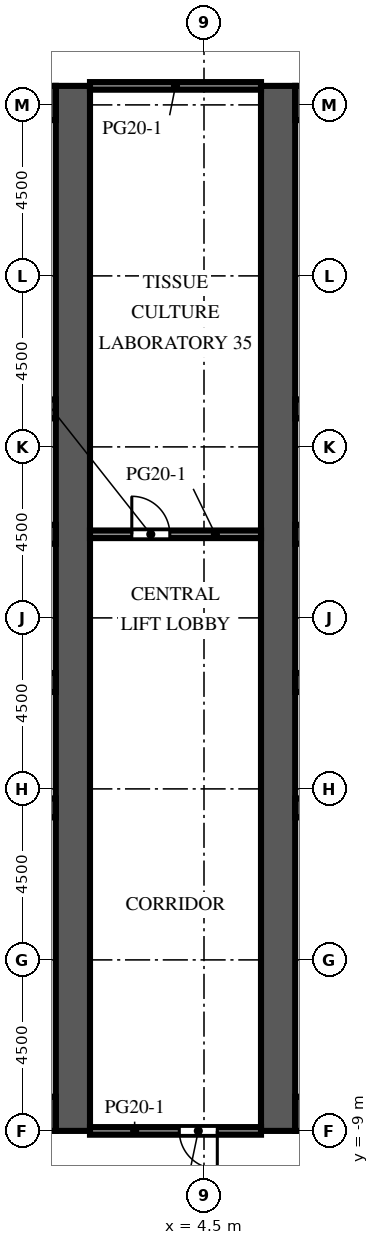
"""IFC4 building model, lengths in metres.
Left out: names, types, materials, properties, quantities, classifications, styles, units other than length and angle.
Written with IfcOpenShell. Run it as: python <this file> out.ifc"""

import sys

from ifc_helpers import new_model, si_unit, direction, frame, frame_2d, origin, place, context, subcontext, project, spatial, rectangle, extrude, element, fill, save


model = new_model("IFC4")
c1 = context("Model", 3, precision=1e-05, world=origin(), true_north=direction((0.0, 1.0)))
c2 = subcontext(c1, "Body", "Model", "MODEL_VIEW")
j1 = project(units=[si_unit("LENGTHUNIT", "METRE"), si_unit("PLANEANGLEUNIT", "RADIAN")], contexts=[c1])
p1 = place(None, origin())
s1 = spatial("IfcSite", under=j1, at=p1, CompositionType="ELEMENT")
p2 = place(p1, origin())
s2 = spatial("IfcBuilding", under=s1, at=p2, CompositionType="ELEMENT")
p3 = place(p2, frame((0.0, 0.0, 86.1)))
s3 = spatial("IfcBuildingStorey", under=s2, at=p3, CompositionType="ELEMENT", Elevation=86.1)
p4 = place(p3, frame((1.05, -9.0, 0.0), z_axis=(0.0, 0.0, 1.0), x_axis=(0.0, 1.0, 0.0)))
e1 = element("IfcWall", 1, at=p4, inside=s3, PredefinedType="SHEAR", context=c2, shape_type="SweptSolid", body=[
    extrude(rectangle(XDim=27.5, YDim=0.9, at=frame_2d((13.75, 0.0))), origin(), (0.0, 0.0, 1.0), 4.1),
])
p5 = place(p4, frame((12.55, 0.0, 0.0)))
e2 = element("IfcOpeningElement", 2, at=p5, cuts=e1, PredefinedType="OPENING", context=c2, shape_type="SweptSolid", body=[
    extrude(rectangle(XDim=2.4, YDim=2.4, at=frame_2d((1.2, 1.2))), frame((0.0, 0.46, 0.0), z_axis=(0.0, -1.0, 0.0), x_axis=(1.0, 0.0, 0.0)), (0.0, 0.0, 1.0), 0.92),
])
p6 = place(p4, frame((3.975, 0.0, 0.0)))
e3 = element("IfcOpeningElement", 3, at=p6, cuts=e1, PredefinedType="OPENING", context=c2, shape_type="SweptSolid", body=[
    extrude(rectangle(XDim=1.2, YDim=2.1, at=frame_2d((0.6, 1.05))), frame((0.0, 0.46, 0.0), z_axis=(0.0, -1.0, 0.0), x_axis=(1.0, 0.0, 0.0)), (0.0, 0.0, 1.0), 0.92),
])
p7 = place(p4, frame((22.325, 0.0, 0.0)))
e4 = element("IfcOpeningElement", 4, at=p7, cuts=e1, PredefinedType="OPENING", context=c2, shape_type="SweptSolid", body=[
    extrude(rectangle(XDim=1.2, YDim=2.1, at=frame_2d((0.6, 1.05))), frame((0.0, 0.46, 0.0), z_axis=(0.0, -1.0, 0.0), x_axis=(1.0, 0.0, 0.0)), (0.0, 0.0, 1.0), 0.92),
])
for number, where, z_axis, x_axis in (
    (5, (-9.6, -8.55, 0.0), (0.0, 0.0, 1.0), (1.0, 0.0, 0.0)),
    (6, (-9.6, 18.05, 0.0), (0.0, 0.0, 1.0), (1.0, 0.0, 0.0)),
):
    element("IfcWall", number, at=place(p3, frame(where, z_axis=z_axis, x_axis=x_axis)), inside=s3, PredefinedType="SHEAR", context=c2, shape_type="SweptSolid", body=[
        extrude(rectangle(XDim=10.2, YDim=0.9, at=frame_2d((5.1, 0.0))), origin(), (0.0, 0.0, 1.0), 4.1),
    ])
p8 = place(p3, frame((-9.6, -0.5, 0.0), z_axis=(0.0, 0.0, 1.0), x_axis=(1.0, 0.0, 0.0)))
e7 = element("IfcWall", 7, at=p8, inside=s3, PredefinedType="SHEAR", context=c2, shape_type="SweptSolid", body=[
    extrude(rectangle(XDim=10.2, YDim=0.5, at=frame_2d((5.1, 0.0))), origin(), (0.0, 0.0, 1.0), 4.1),
])
p9 = place(p3, frame((-9.6, 2.8, 0.0), z_axis=(0.0, 0.0, 1.0), x_axis=(1.0, 0.0, 0.0)))
e8 = element("IfcWall", 8, at=p9, inside=s3, PredefinedType="SHEAR", context=c2, shape_type="SweptSolid", body=[
    extrude(rectangle(XDim=10.2, YDim=0.5, at=frame_2d((5.1, 0.0))), origin(), (0.0, 0.0, 1.0), 4.1),
])
p10 = place(p9, frame((0.562, 0.0, 0.0)))
e9 = element("IfcOpeningElement", 9, at=p10, cuts=e8, PredefinedType="OPENING", context=c2, shape_type="SweptSolid", body=[
    extrude(rectangle(XDim=1.1, YDim=2.1, at=frame_2d((0.55, 1.05))), frame((0.0, 0.26, 0.0), z_axis=(0.0, -1.0, 0.0), x_axis=(1.0, 0.0, 0.0)), (0.0, 0.0, 1.0), 0.52),
])
p11 = place(p9, frame((3.238, 0.0, 0.0)))
e10 = element("IfcOpeningElement", 10, at=p11, cuts=e8, PredefinedType="OPENING", context=c2, shape_type="SweptSolid", body=[
    extrude(rectangle(XDim=1.1, YDim=2.1, at=frame_2d((0.55, 1.05))), frame((0.0, 0.26, 0.0), z_axis=(0.0, -1.0, 0.0), x_axis=(1.0, 0.0, 0.0)), (0.0, 0.0, 1.0), 0.52),
])
p12 = place(p9, frame((8.538, 0.0, 0.0)))
e11 = element("IfcOpeningElement", 11, at=p12, cuts=e8, PredefinedType="OPENING", context=c2, shape_type="SweptSolid", body=[
    extrude(rectangle(XDim=1.1, YDim=2.1, at=frame_2d((0.55, 1.05))), frame((0.0, 0.26, 0.0), z_axis=(0.0, -1.0, 0.0), x_axis=(1.0, 0.0, 0.0)), (0.0, 0.0, 1.0), 0.52),
])
p13 = place(p3, frame((-9.6, 6.7, 0.0), z_axis=(0.0, 0.0, 1.0), x_axis=(1.0, 0.0, 0.0)))
e12 = element("IfcWall", 12, at=p13, inside=s3, PredefinedType="SHEAR", context=c2, shape_type="SweptSolid", body=[
    extrude(rectangle(XDim=10.2, YDim=0.5, at=frame_2d((5.1, 0.0))), origin(), (0.0, 0.0, 1.0), 4.1),
])
p14 = place(p13, frame((0.562, 0.0, 0.0)))
e13 = element("IfcOpeningElement", 13, at=p14, cuts=e12, PredefinedType="OPENING", context=c2, shape_type="SweptSolid", body=[
    extrude(rectangle(XDim=1.1, YDim=2.1, at=frame_2d((0.55, 1.05))), frame((0.0, 0.26, 0.0), z_axis=(0.0, -1.0, 0.0), x_axis=(1.0, 0.0, 0.0)), (0.0, 0.0, 1.0), 0.52),
])
p15 = place(p13, frame((3.288, 0.0, 0.0)))
e14 = element("IfcOpeningElement", 14, at=p15, cuts=e12, PredefinedType="OPENING", context=c2, shape_type="SweptSolid", body=[
    extrude(rectangle(XDim=1.0, YDim=2.1, at=frame_2d((0.5, 1.05))), frame((0.0, 0.26, 0.0), z_axis=(0.0, -1.0, 0.0), x_axis=(1.0, 0.0, 0.0)), (0.0, 0.0, 1.0), 0.52),
])
p16 = place(p13, frame((5.913, 0.0, 0.0)))
e15 = element("IfcOpeningElement", 15, at=p16, cuts=e12, PredefinedType="OPENING", context=c2, shape_type="SweptSolid", body=[
    extrude(rectangle(XDim=1.0, YDim=2.1, at=frame_2d((0.5, 1.05))), frame((0.0, 0.26, 0.0), z_axis=(0.0, -1.0, 0.0), x_axis=(1.0, 0.0, 0.0)), (0.0, 0.0, 1.0), 0.52),
])
p17 = place(p13, frame((8.587, 0.0, 0.0)))
e16 = element("IfcOpeningElement", 16, at=p17, cuts=e12, PredefinedType="OPENING", context=c2, shape_type="SweptSolid", body=[
    extrude(rectangle(XDim=1.0, YDim=2.1, at=frame_2d((0.5, 1.05))), frame((0.0, 0.26, 0.0), z_axis=(0.0, -1.0, 0.0), x_axis=(1.0, 0.0, 0.0)), (0.0, 0.0, 1.0), 0.52),
])
p18 = place(p3, frame((-9.6, 10.0, 0.0), z_axis=(0.0, 0.0, 1.0), x_axis=(1.0, 0.0, 0.0)))
e17 = element("IfcWall", 17, at=p18, inside=s3, PredefinedType="SHEAR", context=c2, shape_type="SweptSolid", body=[
    extrude(rectangle(XDim=10.2, YDim=0.5, at=frame_2d((5.1, 0.0))), origin(), (0.0, 0.0, 1.0), 4.1),
])
p19 = place(p3, frame((6.45, -9.0, 0.0), z_axis=(0.0, 0.0, 1.0), x_axis=(0.0, 1.0, 0.0)))
e18 = element("IfcWall", 18, at=p19, inside=s3, PredefinedType="SHEAR", context=c2, shape_type="SweptSolid", body=[
    extrude(rectangle(XDim=27.5, YDim=0.9, at=frame_2d((13.75, 0.0))), origin(), (0.0, 0.0, 1.0), 4.1),
])
p20 = place(p19, frame((12.55, 0.0, 0.0)))
e19 = element("IfcOpeningElement", 19, at=p20, cuts=e18, PredefinedType="OPENING", context=c2, shape_type="SweptSolid", body=[
    extrude(rectangle(XDim=2.4, YDim=2.4, at=frame_2d((1.2, 1.2))), frame((0.0, 0.46, 0.0), z_axis=(0.0, -1.0, 0.0), x_axis=(1.0, 0.0, 0.0)), (0.0, 0.0, 1.0), 0.92),
])
p21 = place(p19, frame((3.975, 0.0, 0.0)))
e20 = element("IfcOpeningElement", 20, at=p21, cuts=e18, PredefinedType="OPENING", context=c2, shape_type="SweptSolid", body=[
    extrude(rectangle(XDim=1.2, YDim=2.1, at=frame_2d((0.6, 1.05))), frame((0.0, 0.46, 0.0), z_axis=(0.0, -1.0, 0.0), x_axis=(1.0, 0.0, 0.0)), (0.0, 0.0, 1.0), 0.92),
])
p22 = place(p19, frame((22.325, 0.0, 0.0)))
e21 = element("IfcOpeningElement", 21, at=p22, cuts=e18, PredefinedType="OPENING", context=c2, shape_type="SweptSolid", body=[
    extrude(rectangle(XDim=1.2, YDim=2.1, at=frame_2d((0.6, 1.05))), frame((0.0, 0.46, 0.0), z_axis=(0.0, -1.0, 0.0), x_axis=(1.0, 0.0, 0.0)), (0.0, 0.0, 1.0), 0.92),
])
for number, where, z_axis, x_axis in (
    (22, (6.9, -8.55, 0.0), (0.0, 0.0, 1.0), (1.0, 0.0, 0.0)),
    (23, (6.9, 18.05, 0.0), (0.0, 0.0, 1.0), (1.0, 0.0, 0.0)),
):
    element("IfcWall", number, at=place(p3, frame(where, z_axis=z_axis, x_axis=x_axis)), inside=s3, PredefinedType="SHEAR", context=c2, shape_type="SweptSolid", body=[
        extrude(rectangle(XDim=10.2, YDim=0.9, at=frame_2d((5.1, 0.0))), origin(), (0.0, 0.0, 1.0), 4.1),
    ])
p23 = place(p3, frame((6.9, -0.5, 0.0), z_axis=(0.0, 0.0, 1.0), x_axis=(1.0, 0.0, 0.0)))
e24 = element("IfcWall", 24, at=p23, inside=s3, PredefinedType="SHEAR", context=c2, shape_type="SweptSolid", body=[
    extrude(rectangle(XDim=10.2, YDim=0.5, at=frame_2d((5.1, 0.0))), origin(), (0.0, 0.0, 1.0), 4.1),
])
p24 = place(p3, frame((6.9, 2.8, 0.0), z_axis=(0.0, 0.0, 1.0), x_axis=(1.0, 0.0, 0.0)))
e25 = element("IfcWall", 25, at=p24, inside=s3, PredefinedType="SHEAR", context=c2, shape_type="SweptSolid", body=[
    extrude(rectangle(XDim=10.2, YDim=0.5, at=frame_2d((5.1, 0.0))), origin(), (0.0, 0.0, 1.0), 4.1),
])
p25 = place(p24, frame((0.562, 0.0, 0.0)))
e26 = element("IfcOpeningElement", 26, at=p25, cuts=e25, PredefinedType="OPENING", context=c2, shape_type="SweptSolid", body=[
    extrude(rectangle(XDim=1.1, YDim=2.1, at=frame_2d((0.55, 1.05))), frame((0.0, 0.26, 0.0), z_axis=(0.0, -1.0, 0.0), x_axis=(1.0, 0.0, 0.0)), (0.0, 0.0, 1.0), 0.52),
])
p26 = place(p24, frame((3.238, 0.0, 0.0)))
e27 = element("IfcOpeningElement", 27, at=p26, cuts=e25, PredefinedType="OPENING", context=c2, shape_type="SweptSolid", body=[
    extrude(rectangle(XDim=1.1, YDim=2.1, at=frame_2d((0.55, 1.05))), frame((0.0, 0.26, 0.0), z_axis=(0.0, -1.0, 0.0), x_axis=(1.0, 0.0, 0.0)), (0.0, 0.0, 1.0), 0.52),
])
p27 = place(p24, frame((8.538, 0.0, 0.0)))
e28 = element("IfcOpeningElement", 28, at=p27, cuts=e25, PredefinedType="OPENING", context=c2, shape_type="SweptSolid", body=[
    extrude(rectangle(XDim=1.1, YDim=2.1, at=frame_2d((0.55, 1.05))), frame((0.0, 0.26, 0.0), z_axis=(0.0, -1.0, 0.0), x_axis=(1.0, 0.0, 0.0)), (0.0, 0.0, 1.0), 0.52),
])
p28 = place(p3, frame((6.9, 6.7, 0.0), z_axis=(0.0, 0.0, 1.0), x_axis=(1.0, 0.0, 0.0)))
e29 = element("IfcWall", 29, at=p28, inside=s3, PredefinedType="SHEAR", context=c2, shape_type="SweptSolid", body=[
    extrude(rectangle(XDim=10.2, YDim=0.5, at=frame_2d((5.1, 0.0))), origin(), (0.0, 0.0, 1.0), 4.1),
])
p29 = place(p28, frame((0.562, 0.0, 0.0)))
e30 = element("IfcOpeningElement", 30, at=p29, cuts=e29, PredefinedType="OPENING", context=c2, shape_type="SweptSolid", body=[
    extrude(rectangle(XDim=1.1, YDim=2.1, at=frame_2d((0.55, 1.05))), frame((0.0, 0.26, 0.0), z_axis=(0.0, -1.0, 0.0), x_axis=(1.0, 0.0, 0.0)), (0.0, 0.0, 1.0), 0.52),
])
p30 = place(p28, frame((3.288, 0.0, 0.0)))
e31 = element("IfcOpeningElement", 31, at=p30, cuts=e29, PredefinedType="OPENING", context=c2, shape_type="SweptSolid", body=[
    extrude(rectangle(XDim=1.0, YDim=2.1, at=frame_2d((0.5, 1.05))), frame((0.0, 0.26, 0.0), z_axis=(0.0, -1.0, 0.0), x_axis=(1.0, 0.0, 0.0)), (0.0, 0.0, 1.0), 0.52),
])
p31 = place(p28, frame((5.913, 0.0, 0.0)))
e32 = element("IfcOpeningElement", 32, at=p31, cuts=e29, PredefinedType="OPENING", context=c2, shape_type="SweptSolid", body=[
    extrude(rectangle(XDim=1.0, YDim=2.1, at=frame_2d((0.5, 1.05))), frame((0.0, 0.26, 0.0), z_axis=(0.0, -1.0, 0.0), x_axis=(1.0, 0.0, 0.0)), (0.0, 0.0, 1.0), 0.52),
])
p32 = place(p28, frame((8.587, 0.0, 0.0)))
e33 = element("IfcOpeningElement", 33, at=p32, cuts=e29, PredefinedType="OPENING", context=c2, shape_type="SweptSolid", body=[
    extrude(rectangle(XDim=1.0, YDim=2.1, at=frame_2d((0.5, 1.05))), frame((0.0, 0.26, 0.0), z_axis=(0.0, -1.0, 0.0), x_axis=(1.0, 0.0, 0.0)), (0.0, 0.0, 1.0), 0.52),
])
p33 = place(p3, frame((6.9, 10.0, 0.0), z_axis=(0.0, 0.0, 1.0), x_axis=(1.0, 0.0, 0.0)))
e34 = element("IfcWall", 34, at=p33, inside=s3, PredefinedType="SHEAR", context=c2, shape_type="SweptSolid", body=[
    extrude(rectangle(XDim=10.2, YDim=0.5, at=frame_2d((5.1, 0.0))), origin(), (0.0, 0.0, 1.0), 4.1),
])
p34 = place(p3, frame((6.0, -9.0, 0.0), z_axis=(0.0, 0.0, 1.0), x_axis=(-1.0, 0.0, 0.0)))
e35 = element("IfcWall", 35, at=p34, inside=s3, PredefinedType="PARTITIONING", context=c2, shape_type="SweptSolid", body=[
    extrude(rectangle(XDim=4.5, YDim=0.2, at=frame_2d((2.25, 0.0))), origin(), (0.0, 0.0, 1.0), 3.65),
])
p35 = place(p34, frame((1.15, 0.0, 0.0)))
e36 = element("IfcOpeningElement", 36, at=p35, cuts=e35, PredefinedType="OPENING", context=c2, shape_type="SweptSolid", body=[
    extrude(rectangle(XDim=1.0, YDim=2.1, at=frame_2d((0.5, 1.05))), frame((0.0, 0.11, 0.0), z_axis=(0.0, -1.0, 0.0), x_axis=(1.0, 0.0, 0.0)), (0.0, 0.0, 1.0), 0.22),
])
p36 = place(p3, frame((1.5, 6.7, 0.0), z_axis=(0.0, 0.0, 1.0), x_axis=(1.0, 0.0, 0.0)))
e37 = element("IfcWall", 37, at=p36, inside=s3, PredefinedType="PARTITIONING", context=c2, shape_type="SweptSolid", body=[
    extrude(rectangle(XDim=4.5, YDim=0.2, at=frame_2d((2.25, 0.0))), origin(), (0.0, 0.0, 1.0), 3.65),
])
p37 = place(p36, frame((1.1, 0.0, 0.0)))
e38 = element("IfcOpeningElement", 38, at=p37, cuts=e37, PredefinedType="OPENING", context=c2, shape_type="SweptSolid", body=[
    extrude(rectangle(XDim=1.0, YDim=2.1, at=frame_2d((0.5, 1.05))), frame((0.0, 0.11, 0.0), z_axis=(0.0, -1.0, 0.0), x_axis=(1.0, 0.0, 0.0)), (0.0, 0.0, 1.0), 0.22),
])
p38 = place(p3, frame((1.5, 18.5, 0.0), z_axis=(0.0, 0.0, 1.0), x_axis=(1.0, 0.0, 0.0)))
e39 = element("IfcWall", 39, at=p38, inside=s3, PredefinedType="PARTITIONING", context=c2, shape_type="SweptSolid", body=[
    extrude(rectangle(XDim=4.5, YDim=0.2, at=frame_2d((2.25, 0.0))), origin(), (0.0, 0.0, 1.0), 3.65),
])
p39 = place(p5, origin())
e40 = element("IfcDoor", 40, at=p39, inside=s3, OperationType="DOUBLE_DOOR_DOUBLE_SWING", PredefinedType="DOOR", context=c2, shape_type="SweptSolid", body=[
    extrude(rectangle(XDim=2.4, YDim=2.4, at=frame_2d((1.2, 1.2))), frame((0.0, 0.025, 0.0), z_axis=(0.0, -1.0, 0.0), x_axis=(1.0, 0.0, 0.0)), (0.0, 0.0, 1.0), 0.05),
])
fill(e2, e40)
p40 = place(p20, origin())
e41 = element("IfcDoor", 41, at=p40, inside=s3, OperationType="DOUBLE_DOOR_DOUBLE_SWING", PredefinedType="DOOR", context=c2, shape_type="SweptSolid", body=[
    extrude(rectangle(XDim=2.4, YDim=2.4, at=frame_2d((1.2, 1.2))), frame((0.0, 0.025, 0.0), z_axis=(0.0, -1.0, 0.0), x_axis=(1.0, 0.0, 0.0)), (0.0, 0.0, 1.0), 0.05),
])
fill(e19, e41)
p41 = place(p6, origin())
e42 = element("IfcDoor", 42, at=p41, inside=s3, OperationType="SINGLE_SWING_LEFT", PredefinedType="DOOR", context=c2, shape_type="SweptSolid", body=[
    extrude(rectangle(XDim=1.2, YDim=2.1, at=frame_2d((0.6, 1.05))), frame((0.0, 0.425, 0.0), z_axis=(0.0, -1.0, 0.0), x_axis=(1.0, 0.0, 0.0)), (0.0, 0.0, 1.0), 0.05),
])
fill(e3, e42)
p42 = place(p7, origin())
e43 = element("IfcDoor", 43, at=p42, inside=s3, OperationType="SINGLE_SWING_LEFT", PredefinedType="DOOR", context=c2, shape_type="SweptSolid", body=[
    extrude(rectangle(XDim=1.2, YDim=2.1, at=frame_2d((0.6, 1.05))), frame((0.0, 0.425, 0.0), z_axis=(0.0, -1.0, 0.0), x_axis=(1.0, 0.0, 0.0)), (0.0, 0.0, 1.0), 0.05),
])
fill(e4, e43)
p43 = place(p21, origin())
e44 = element("IfcDoor", 44, at=p43, inside=s3, OperationType="SINGLE_SWING_RIGHT", PredefinedType="DOOR", context=c2, shape_type="SweptSolid", body=[
    extrude(rectangle(XDim=1.2, YDim=2.1, at=frame_2d((0.6, 1.05))), frame((0.0, -0.375, 0.0), z_axis=(0.0, -1.0, 0.0), x_axis=(1.0, 0.0, 0.0)), (0.0, 0.0, 1.0), 0.05),
])
fill(e20, e44)
p44 = place(p22, origin())
e45 = element("IfcDoor", 45, at=p44, inside=s3, OperationType="SINGLE_SWING_RIGHT", PredefinedType="DOOR", context=c2, shape_type="SweptSolid", body=[
    extrude(rectangle(XDim=1.2, YDim=2.1, at=frame_2d((0.6, 1.05))), frame((0.0, -0.375, 0.0), z_axis=(0.0, -1.0, 0.0), x_axis=(1.0, 0.0, 0.0)), (0.0, 0.0, 1.0), 0.05),
])
fill(e21, e45)
p45 = place(p35, origin())
e46 = element("IfcDoor", 46, at=p45, inside=s3, OperationType="SINGLE_SWING_LEFT", PredefinedType="DOOR", context=c2, shape_type="SweptSolid", body=[
    extrude(rectangle(XDim=1.0, YDim=2.1, at=frame_2d((0.5, 1.05))), frame((0.0, 0.025, 0.0), z_axis=(0.0, -1.0, 0.0), x_axis=(1.0, 0.0, 0.0)), (0.0, 0.0, 1.0), 0.05),
])
fill(e36, e46)
p46 = place(p37, origin())
e47 = element("IfcDoor", 47, at=p46, inside=s3, OperationType="SINGLE_SWING_LEFT", PredefinedType="DOOR", context=c2, shape_type="SweptSolid", body=[
    extrude(rectangle(XDim=1.0, YDim=2.1, at=frame_2d((0.5, 1.05))), frame((0.0, 0.025, 0.0), z_axis=(0.0, -1.0, 0.0), x_axis=(1.0, 0.0, 0.0)), (0.0, 0.0, 1.0), 0.05),
])
fill(e38, e47)
save(model, sys.argv[1])
